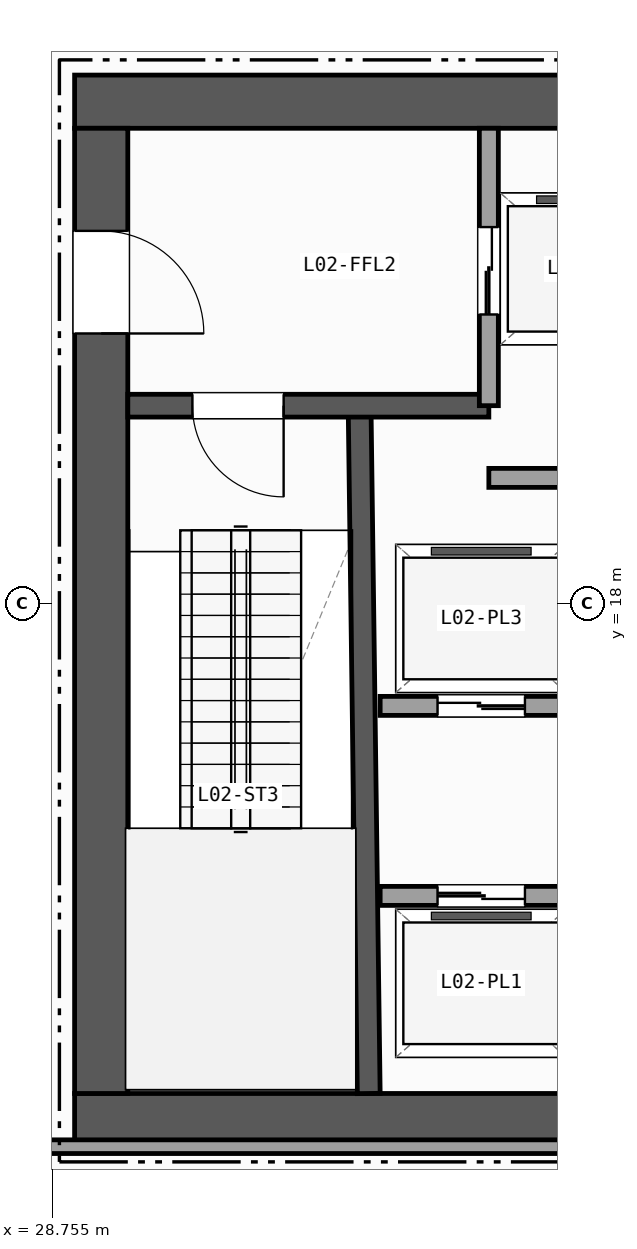
"""IFC4 building model, lengths in metres.
Left out: names, types, materials, properties, quantities, classifications, styles, units other than length and angle.
Written with IfcOpenShell. Run it as: python <this file> out.ifc"""

import sys

from ifc_helpers import new_model, si_unit, direction, frame, frame_2d, origin, place, context, subcontext, project, spatial, rectangle, extrude, element, fill, save


model = new_model("IFC4")
c1 = context("Model", 3, precision=1e-05, world=origin(), true_north=direction((0.0, 1.0)))
c2 = subcontext(c1, "Body", "Model", "MODEL_VIEW")
j1 = project(units=[si_unit("LENGTHUNIT", "METRE"), si_unit("PLANEANGLEUNIT", "RADIAN")], contexts=[c1])
p1 = place(None, origin())
s1 = spatial("IfcSite", under=j1, at=p1, CompositionType="ELEMENT")
p2 = place(p1, origin())
s2 = spatial("IfcBuilding", under=s1, at=p2, CompositionType="ELEMENT")
p3 = place(p2, frame((0.0, 0.0, 11.0)))
s3 = spatial("IfcBuildingStorey", under=s2, at=p3, CompositionType="ELEMENT", Elevation=11.0)
p4 = place(p3, frame((29.05, 11.2, 0.0), z_axis=(0.0, 0.0, 1.0), x_axis=(1.0, 0.0, 0.0)))
e1 = element("IfcWall", 1, at=p4, inside=s3, PredefinedType="SHEAR", context=c2, shape_type="SweptSolid", body=[
    extrude(rectangle(XDim=14.1, YDim=0.7, at=frame_2d((7.05, 0.0))), origin(), (0.0, 0.0, 1.0), 4.88),
])
p5 = place(p3, frame((43.15, 24.6, 0.0), z_axis=(0.0, 0.0, 1.0), x_axis=(-1.0, 0.0, 0.0)))
e2 = element("IfcWall", 2, at=p5, inside=s3, PredefinedType="SHEAR", context=c2, shape_type="SweptSolid", body=[
    extrude(rectangle(XDim=14.1, YDim=0.7, at=frame_2d((7.05, 0.0))), origin(), (0.0, 0.0, 1.0), 4.88),
])
p6 = place(p5, frame((0.85, 0.0, 0.0)))
e3 = element("IfcOpeningElement", 3, at=p6, cuts=e2, PredefinedType="OPENING", context=c2, shape_type="SweptSolid", body=[
    extrude(rectangle(XDim=1.1, YDim=2.15, at=frame_2d((0.55, 1.075))), frame((0.0, 0.36, 0.0), z_axis=(0.0, -1.0, 0.0), x_axis=(1.0, 0.0, 0.0)), (0.0, 0.0, 1.0), 0.72),
])
p7 = place(p5, frame((2.8, 0.0, 0.0)))
e4 = element("IfcOpeningElement", 4, at=p7, cuts=e2, PredefinedType="OPENING", context=c2, shape_type="SweptSolid", body=[
    extrude(rectangle(XDim=0.9, YDim=2.1, at=frame_2d((0.45, 1.05))), frame((0.0, 0.36, 0.0), z_axis=(0.0, -1.0, 0.0), x_axis=(1.0, 0.0, 0.0)), (0.0, 0.0, 1.0), 0.72),
])
p8 = place(p5, frame((4.7, 0.0, 0.0)))
e5 = element("IfcOpeningElement", 5, at=p8, cuts=e2, PredefinedType="OPENING", context=c2, shape_type="SweptSolid", body=[
    extrude(rectangle(XDim=0.9, YDim=2.1, at=frame_2d((0.45, 1.05))), frame((0.0, 0.36, 0.0), z_axis=(0.0, -1.0, 0.0), x_axis=(1.0, 0.0, 0.0)), (0.0, 0.0, 1.0), 0.72),
])
p9 = place(p3, frame((29.4, 24.25, 0.0), z_axis=(0.0, 0.0, 1.0), x_axis=(0.0, -1.0, 0.0)))
e6 = element("IfcWall", 6, at=p9, inside=s3, PredefinedType="SHEAR", context=c2, shape_type="SweptSolid", body=[
    extrude(rectangle(XDim=12.7, YDim=0.7, at=frame_2d((6.35, 0.0))), origin(), (0.0, 0.0, 1.0), 4.88),
])
p10 = place(p9, frame((1.35, 0.0, 0.0)))
e7 = element("IfcOpeningElement", 7, at=p10, cuts=e6, PredefinedType="OPENING", context=c2, shape_type="SweptSolid", body=[
    extrude(rectangle(XDim=1.35, YDim=2.15, at=frame_2d((0.675, 1.075))), frame((0.0, 0.36, 0.0), z_axis=(0.0, -1.0, 0.0), x_axis=(1.0, 0.0, 0.0)), (0.0, 0.0, 1.0), 0.72),
])
p11 = place(p3, frame((32.92, 11.55, 0.0), z_axis=(0.0, 0.0, 1.0), x_axis=(-0.01331804616, 0.99991131089, 0.0)))
e8 = element("IfcWall", 8, at=p11, inside=s3, PredefinedType="SHEAR", context=c2, shape_type="SweptSolid", body=[
    extrude(rectangle(XDim=9.001, YDim=0.3, at=frame_2d((4.5, 0.0))), origin(), (0.0, 0.0, 1.0), 4.88),
])
p12 = place(p3, frame((34.5, 20.6, 0.0), z_axis=(0.0, 0.0, 1.0), x_axis=(-1.0, 0.0, 0.0)))
e9 = element("IfcWall", 9, at=p12, inside=s3, PredefinedType="SHEAR", context=c2, shape_type="SweptSolid", body=[
    extrude(rectangle(XDim=4.75, YDim=0.3, at=frame_2d((2.375, 0.0))), origin(), (0.0, 0.0, 1.0), 4.88),
])
p13 = place(p12, frame((2.7, 0.0, 0.0)))
e10 = element("IfcOpeningElement", 10, at=p13, cuts=e9, PredefinedType="OPENING", context=c2, shape_type="SweptSolid", body=[
    extrude(rectangle(XDim=1.2, YDim=2.15, at=frame_2d((0.6, 1.075))), frame((0.0, 0.16, 0.0), z_axis=(0.0, -1.0, 0.0), x_axis=(1.0, 0.0, 0.0)), (0.0, 0.0, 1.0), 0.32),
])
p14 = place(p3, frame((34.5, 20.6, 0.0), z_axis=(0.0, 0.0, 1.0), x_axis=(0.0, 1.0, 0.0)))
e11 = element("IfcWall", 11, at=p14, inside=s3, PredefinedType="PARTITIONING", context=c2, shape_type="SweptSolid", body=[
    extrude(rectangle(XDim=3.65, YDim=0.25, at=frame_2d((1.825, 0.0))), origin(), (0.0, 0.0, 1.0), 4.88),
])
p15 = place(p14, frame((1.2, 0.0, 0.0)))
e12 = element("IfcOpeningElement", 12, at=p15, cuts=e11, PredefinedType="OPENING", context=c2, shape_type="SweptSolid", body=[
    extrude(rectangle(XDim=1.15, YDim=2.15, at=frame_2d((0.575, 1.075))), frame((0.0, 0.135, 0.0), z_axis=(0.0, -1.0, 0.0), x_axis=(1.0, 0.0, 0.0)), (0.0, 0.0, 1.0), 0.27),
])
p16 = place(p3, frame((34.5, 19.65, 0.0), z_axis=(0.0, 0.0, 1.0), x_axis=(1.0, 0.0, 0.0)))
e13 = element("IfcWall", 13, at=p16, inside=s3, PredefinedType="PARTITIONING", context=c2, shape_type="SweptSolid", body=[
    extrude(rectangle(XDim=6.48, YDim=0.25, at=frame_2d((3.24, 0.0))), origin(), (0.0, 0.0, 1.0), 4.88),
])
p17 = place(p3, frame((33.07, 14.15, 0.0), z_axis=(0.0, 0.0, 1.0), x_axis=(1.0, 0.0, 0.0)))
e14 = element("IfcWall", 14, at=p17, inside=s3, PredefinedType="PARTITIONING", context=c2, shape_type="SweptSolid", body=[
    extrude(rectangle(XDim=9.38, YDim=0.25, at=frame_2d((4.69, 0.0))), origin(), (0.0, 0.0, 1.0), 4.88),
])
p18 = place(p17, frame((0.755, 0.0, 0.0)))
e15 = element("IfcOpeningElement", 15, at=p18, cuts=e14, PredefinedType="OPENING", context=c2, shape_type="SweptSolid", body=[
    extrude(rectangle(XDim=1.15, YDim=2.15, at=frame_2d((0.575, 1.075))), frame((0.0, 0.135, 0.0), z_axis=(0.0, -1.0, 0.0), x_axis=(1.0, 0.0, 0.0)), (0.0, 0.0, 1.0), 0.27),
])
p19 = place(p17, frame((3.355, 0.0, 0.0)))
e16 = element("IfcOpeningElement", 16, at=p19, cuts=e14, PredefinedType="OPENING", context=c2, shape_type="SweptSolid", body=[
    extrude(rectangle(XDim=1.15, YDim=2.15, at=frame_2d((0.575, 1.075))), frame((0.0, 0.135, 0.0), z_axis=(0.0, -1.0, 0.0), x_axis=(1.0, 0.0, 0.0)), (0.0, 0.0, 1.0), 0.27),
])
p20 = place(p3, frame((40.98, 16.65, 0.0), z_axis=(0.0, 0.0, 1.0), x_axis=(-1.0, 0.0, 0.0)))
e17 = element("IfcWall", 17, at=p20, inside=s3, PredefinedType="PARTITIONING", context=c2, shape_type="SweptSolid", body=[
    extrude(rectangle(XDim=7.91, YDim=0.25, at=frame_2d((3.955, 0.0))), origin(), (0.0, 0.0, 1.0), 4.88),
])
p21 = place(p20, frame((6.005, 0.0, 0.0)))
e18 = element("IfcOpeningElement", 18, at=p21, cuts=e17, PredefinedType="OPENING", context=c2, shape_type="SweptSolid", body=[
    extrude(rectangle(XDim=1.15, YDim=2.15, at=frame_2d((0.575, 1.075))), frame((0.0, 0.135, 0.0), z_axis=(0.0, -1.0, 0.0), x_axis=(1.0, 0.0, 0.0)), (0.0, 0.0, 1.0), 0.27),
])
p22 = place(p20, frame((3.405, 0.0, 0.0)))
e19 = element("IfcOpeningElement", 19, at=p22, cuts=e17, PredefinedType="OPENING", context=c2, shape_type="SweptSolid", body=[
    extrude(rectangle(XDim=1.15, YDim=2.15, at=frame_2d((0.575, 1.075))), frame((0.0, 0.135, 0.0), z_axis=(0.0, -1.0, 0.0), x_axis=(1.0, 0.0, 0.0)), (0.0, 0.0, 1.0), 0.27),
])
p23 = place(p3, frame((24.65, 10.85, 0.0), z_axis=(0.0, 0.0, 1.0), x_axis=(1.0, 0.0, 0.0)))
e20 = element("IfcWall", 20, at=p23, inside=s3, PredefinedType="PARTITIONING", context=c2, shape_type="SweptSolid", body=[
    extrude(rectangle(XDim=38.35, YDim=0.18, at=frame_2d((19.175, 0.0))), origin(), (0.0, 0.0, 1.0), 4.005),
])
p24 = place(p23, frame((2.0, 0.0, 0.0)))
e21 = element("IfcOpeningElement", 21, at=p24, cuts=e20, PredefinedType="OPENING", context=c2, shape_type="SweptSolid", body=[
    extrude(rectangle(XDim=1.2, YDim=2.15, at=frame_2d((0.6, 1.075))), frame((0.0, 0.1, 0.0), z_axis=(0.0, -1.0, 0.0), x_axis=(1.0, 0.0, 0.0)), (0.0, 0.0, 1.0), 0.2),
])
p25 = place(p13, origin())
e22 = element("IfcDoor", 22, at=p25, inside=s3, OperationType="SINGLE_SWING_LEFT", PredefinedType="DOOR", context=c2, shape_type="SweptSolid", body=[
    extrude(rectangle(XDim=1.2, YDim=2.15, at=frame_2d((0.6, 1.075))), frame((0.0, 0.025, 0.0), z_axis=(0.0, -1.0, 0.0), x_axis=(1.0, 0.0, 0.0)), (0.0, 0.0, 1.0), 0.05),
])
fill(e10, e22)
p26 = place(p10, origin())
e23 = element("IfcDoor", 23, at=p26, inside=s3, OperationType="SINGLE_SWING_RIGHT", PredefinedType="DOOR", context=c2, shape_type="SweptSolid", body=[
    extrude(rectangle(XDim=1.35, YDim=2.15, at=frame_2d((0.675, 1.075))), frame((0.0, 0.025, 0.0), z_axis=(0.0, -1.0, 0.0), x_axis=(1.0, 0.0, 0.0)), (0.0, 0.0, 1.0), 0.05),
])
fill(e7, e23)
p27 = place(p15, origin())
e24 = element("IfcDoor", 24, at=p27, inside=s3, OperationType="DOUBLE_DOOR_SLIDING", PredefinedType="DOOR", context=c2, shape_type="SweptSolid", body=[
    extrude(rectangle(XDim=1.15, YDim=2.15, at=frame_2d((0.575, 1.075))), frame((0.0, 0.025, 0.0), z_axis=(0.0, -1.0, 0.0), x_axis=(1.0, 0.0, 0.0)), (0.0, 0.0, 1.0), 0.05),
])
fill(e12, e24)
p28 = place(p18, origin())
e25 = element("IfcDoor", 25, at=p28, inside=s3, OperationType="DOUBLE_DOOR_SLIDING", PredefinedType="DOOR", context=c2, shape_type="SweptSolid", body=[
    extrude(rectangle(XDim=1.15, YDim=2.15, at=frame_2d((0.575, 1.075))), frame((0.0, 0.025, 0.0), z_axis=(0.0, -1.0, 0.0), x_axis=(1.0, 0.0, 0.0)), (0.0, 0.0, 1.0), 0.05),
])
fill(e15, e25)
p29 = place(p21, origin())
e26 = element("IfcDoor", 26, at=p29, inside=s3, OperationType="DOUBLE_DOOR_SLIDING", PredefinedType="DOOR", context=c2, shape_type="SweptSolid", body=[
    extrude(rectangle(XDim=1.15, YDim=2.15, at=frame_2d((0.575, 1.075))), frame((0.0, 0.025, 0.0), z_axis=(0.0, -1.0, 0.0), x_axis=(1.0, 0.0, 0.0)), (0.0, 0.0, 1.0), 0.05),
])
fill(e18, e26)
save(model, sys.argv[1])
